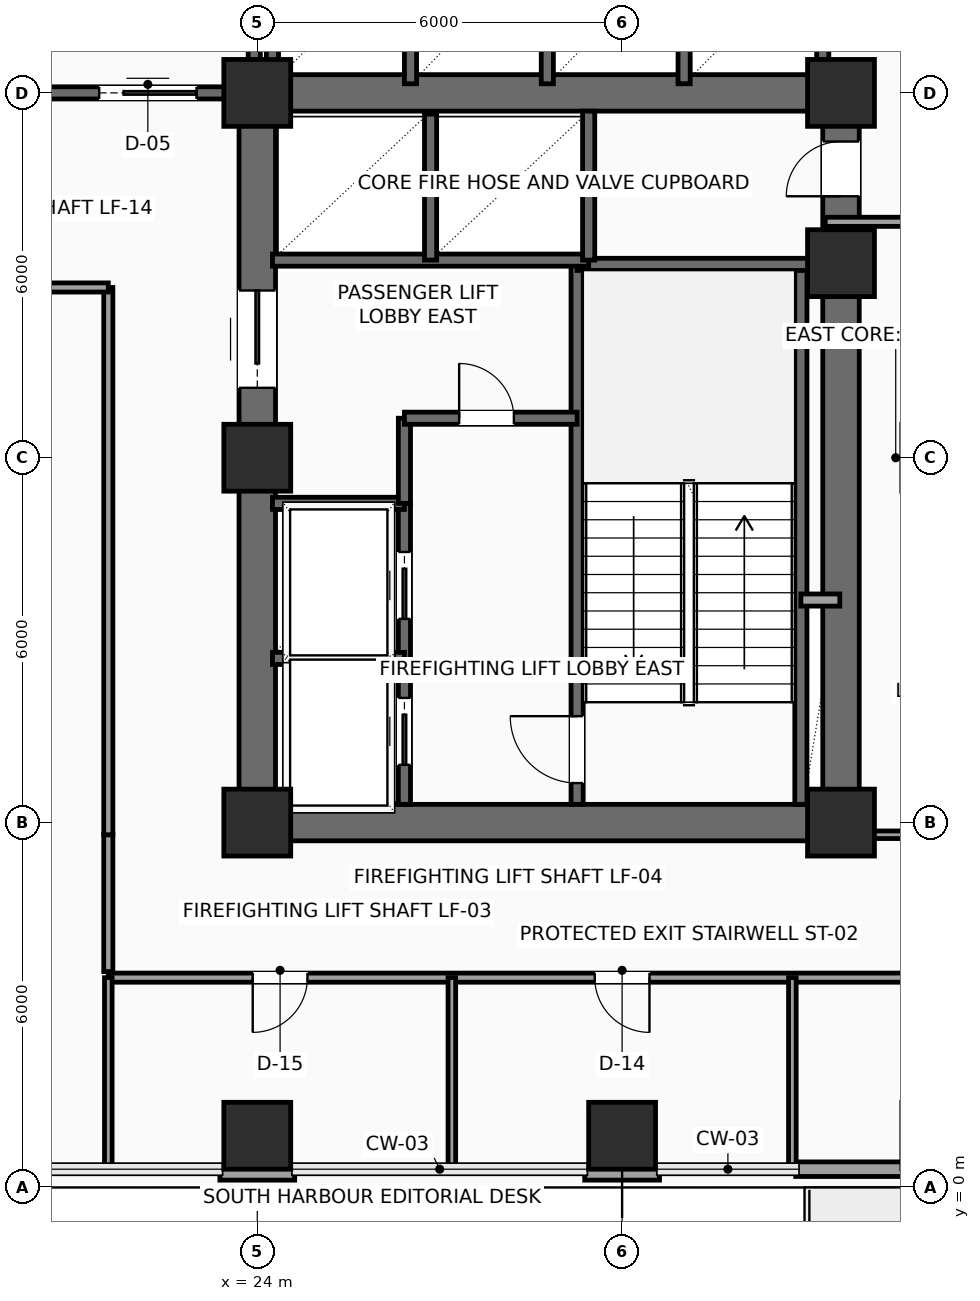
"""IFC4 building model, lengths in metres.
Left out: names, types, materials, properties, quantities, classifications, styles, units other than length and angle.
Written with IfcOpenShell. Run it as: python <this file> out.ifc"""

import sys

from ifc_helpers import new_model, si_unit, direction, frame, frame_2d, origin, origin_2d, place, context, subcontext, project, spatial, rectangle, extrude, element, fill, save


model = new_model("IFC4")
c1 = context("Model", 3, precision=1e-05, world=origin(), true_north=direction((0.0, 1.0)))
c2 = subcontext(c1, "Body", "Model", "MODEL_VIEW")
j1 = project(units=[si_unit("LENGTHUNIT", "METRE"), si_unit("PLANEANGLEUNIT", "RADIAN")], contexts=[c1])
p1 = place(None, origin())
s1 = spatial("IfcSite", under=j1, at=p1, CompositionType="ELEMENT")
p2 = place(p1, origin())
s2 = spatial("IfcBuilding", under=s1, at=p2, CompositionType="ELEMENT")
p3 = place(p2, frame((0.0, 0.0, 103.35)))
s3 = spatial("IfcBuildingStorey", under=s2, at=p3, CompositionType="ELEMENT", Elevation=103.35)
for number, where, z_axis, x_axis in (
    (1, (24.0, 6.0, 0.0), (0.0, 0.0, 1.0), (1.0, 0.0, 0.0)),
    (2, (24.0, 12.0, 0.0), (0.0, 0.0, 1.0), (1.0, 0.0, 0.0)),
    (3, (24.0, 18.0, 0.0), (0.0, 0.0, 1.0), (1.0, 0.0, 0.0)),
    (4, (33.6, 6.0, 0.0), (0.0, 0.0, 1.0), (1.0, 0.0, 0.0)),
    (5, (33.6, 15.2, 0.0), (0.0, 0.0, 1.0), (1.0, 0.0, 0.0)),
    (6, (33.6, 18.0, 0.0), (0.0, 0.0, 1.0), (1.0, 0.0, 0.0)),
    (7, (24.0, 0.85, 0.0), (0.0, 0.0, 1.0), (1.0, 0.0, 0.0)),
    (8, (30.0, 0.85, 0.0), (0.0, 0.0, 1.0), (1.0, 0.0, 0.0)),
):
    element("IfcColumn", number, at=place(p3, frame(where, z_axis=z_axis, x_axis=x_axis)), inside=s3, PredefinedType="COLUMN", context=c2, shape_type="SweptSolid", body=[
        extrude(rectangle(XDim=1.1, YDim=1.1, at=origin_2d()), origin(), (0.0, 0.0, 1.0), 3.75),
    ])
p4 = place(p3, frame((42.145, 0.3, 0.0), z_axis=(0.0, 0.0, 1.0), x_axis=(-1.0, 0.0, 0.0)))
e9 = element("IfcWall", 9, at=p4, inside=s3, PredefinedType="SOLIDWALL", context=c2, shape_type="SweptSolid", body=[
    extrude(rectangle(XDim=9.29, YDim=0.24, at=frame_2d((4.645, 0.0))), origin(), (0.0, 0.0, 1.0), 3.525),
])
p5 = place(p4, frame((4.2, 0.0, 0.0)))
e10 = element("IfcOpeningElement", 10, at=p5, cuts=e9, PredefinedType="OPENING", context=c2, shape_type="SweptSolid", body=[
    extrude(rectangle(XDim=1.05, YDim=2.2, at=frame_2d((0.525, 1.1))), frame((0.0, 0.13, 0.0), z_axis=(0.0, -1.0, 0.0), x_axis=(1.0, 0.0, 0.0)), (0.0, 0.0, 1.0), 0.26),
])
for number, where, z_axis, x_axis in (
    (11, (30.615, 0.24, 0.0), (0.0, 0.0, 1.0), (-1.0, 0.0, 0.0)),
    (12, (24.615, 0.24, 0.0), (0.0, 0.0, 1.0), (-1.0, 0.0, 0.0)),
):
    element("IfcWall", number, at=place(p3, frame(where, z_axis=z_axis, x_axis=x_axis)), inside=s3, PredefinedType="SOLIDWALL", context=c2, shape_type="SweptSolid", body=[
        extrude(rectangle(XDim=1.23, YDim=0.24, at=frame_2d((0.615, 0.0))), origin(), (0.0, 0.0, 1.0), 3.525),
    ])
for number, where, z_axis, x_axis in (
    (13, (24.0, 6.0, 0.0), (0.0, 0.0, 1.0), (1.0, 0.0, 0.0)),
    (14, (24.0, 18.0, 0.0), (0.0, 0.0, 1.0), (1.0, 0.0, 0.0)),
):
    element("IfcWall", number, at=place(p3, frame(where, z_axis=z_axis, x_axis=x_axis)), inside=s3, PredefinedType="SHEAR", context=c2, shape_type="SweptSolid", body=[
        extrude(rectangle(XDim=9.6, YDim=0.6, at=frame_2d((4.8, 0.0))), origin(), (0.0, 0.0, 1.0), 3.525),
    ])
p6 = place(p3, frame((24.0, 6.0, 0.0), z_axis=(0.0, 0.0, 1.0), x_axis=(0.0, 1.0, 0.0)))
e15 = element("IfcWall", 15, at=p6, inside=s3, PredefinedType="SHEAR", context=c2, shape_type="SweptSolid", body=[
    extrude(rectangle(XDim=12.0, YDim=0.6, at=frame_2d((6.0, 0.0))), origin(), (0.0, 0.0, 1.0), 3.525),
])
p7 = place(p6, frame((7.15, 0.0, 0.0)))
e16 = element("IfcOpeningElement", 16, at=p7, cuts=e15, PredefinedType="OPENING", context=c2, shape_type="SweptSolid", body=[
    extrude(rectangle(XDim=1.6, YDim=2.3, at=frame_2d((0.8, 1.15))), frame((0.0, 0.31, 0.0), z_axis=(0.0, -1.0, 0.0), x_axis=(1.0, 0.0, 0.0)), (0.0, 0.0, 1.0), 0.62),
])
p8 = place(p3, frame((33.6, 6.0, 0.0), z_axis=(0.0, 0.0, 1.0), x_axis=(0.0, 1.0, 0.0)))
e17 = element("IfcWall", 17, at=p8, inside=s3, PredefinedType="SHEAR", context=c2, shape_type="SweptSolid", body=[
    extrude(rectangle(XDim=12.0, YDim=0.6, at=frame_2d((6.0, 0.0))), origin(), (0.0, 0.0, 1.0), 3.525),
])
p9 = place(p8, frame((10.3, 0.0, 0.0)))
e18 = element("IfcOpeningElement", 18, at=p9, cuts=e17, PredefinedType="OPENING", context=c2, shape_type="SweptSolid", body=[
    extrude(rectangle(XDim=0.9, YDim=2.15, at=frame_2d((0.45, 1.075))), frame((0.0, 0.31, 0.0), z_axis=(0.0, -1.0, 0.0), x_axis=(1.0, 0.0, 0.0)), (0.0, 0.0, 1.0), 0.62),
])
p10 = place(p3, frame((29.26, 6.3, 0.0), z_axis=(0.0, 0.0, 1.0), x_axis=(0.0, 1.0, 0.0)))
e19 = element("IfcWall", 19, at=p10, inside=s3, PredefinedType="SHEAR", context=c2, shape_type="SweptSolid", body=[
    extrude(rectangle(XDim=8.88, YDim=0.2, at=frame_2d((4.44, 0.0))), origin(), (0.0, 0.0, 1.0), 3.525),
])
p11 = place(p10, frame((0.35, 0.0, 0.0)))
e20 = element("IfcOpeningElement", 20, at=p11, cuts=e19, PredefinedType="OPENING", context=c2, shape_type="SweptSolid", body=[
    extrude(rectangle(XDim=1.1, YDim=2.2, at=frame_2d((0.55, 1.1))), frame((0.0, 0.11, 0.0), z_axis=(0.0, -1.0, 0.0), x_axis=(1.0, 0.0, 0.0)), (0.0, 0.0, 1.0), 0.22),
])
p12 = place(p3, frame((32.94, 6.3, 0.0), z_axis=(0.0, 0.0, 1.0), x_axis=(0.0, 1.0, 0.0)))
e21 = element("IfcWall", 21, at=p12, inside=s3, PredefinedType="SHEAR", context=c2, shape_type="SweptSolid", body=[
    extrude(rectangle(XDim=8.88, YDim=0.2, at=frame_2d((4.44, 0.0))), origin(), (0.0, 0.0, 1.0), 3.525),
])
p13 = place(p3, frame((29.26, 15.18, 0.0), z_axis=(0.0, 0.0, 1.0), x_axis=(1.0, 0.0, 0.0)))
e22 = element("IfcWall", 22, at=p13, inside=s3, PredefinedType="SHEAR", context=c2, shape_type="SweptSolid", body=[
    extrude(rectangle(XDim=4.04, YDim=0.2, at=frame_2d((2.02, 0.0))), origin(), (0.0, 0.0, 1.0), 3.525),
])
p14 = place(p3, frame((26.42, 6.3, 0.0), z_axis=(0.0, 0.0, 1.0), x_axis=(0.0, 1.0, 0.0)))
e23 = element("IfcWall", 23, at=p14, inside=s3, PredefinedType="SHEAR", context=c2, shape_type="SweptSolid", body=[
    extrude(rectangle(XDim=4.95, YDim=0.2, at=frame_2d((2.475, 0.0))), origin(), (0.0, 0.0, 1.0), 3.525),
])
p15 = place(p14, frame((0.65, 0.0, 0.0)))
e24 = element("IfcOpeningElement", 24, at=p15, cuts=e23, PredefinedType="OPENING", context=c2, shape_type="SweptSolid", body=[
    extrude(rectangle(XDim=1.1, YDim=2.2, at=frame_2d((0.55, 1.1))), frame((0.0, 0.11, 0.0), z_axis=(0.0, -1.0, 0.0), x_axis=(1.0, 0.0, 0.0)), (0.0, 0.0, 1.0), 0.22),
])
p16 = place(p14, frame((3.05, 0.0, 0.0)))
e25 = element("IfcOpeningElement", 25, at=p16, cuts=e23, PredefinedType="OPENING", context=c2, shape_type="SweptSolid", body=[
    extrude(rectangle(XDim=1.1, YDim=2.2, at=frame_2d((0.55, 1.1))), frame((0.0, 0.11, 0.0), z_axis=(0.0, -1.0, 0.0), x_axis=(1.0, 0.0, 0.0)), (0.0, 0.0, 1.0), 0.22),
])
for number, where, z_axis, x_axis in (
    (26, (24.25, 8.7, 0.0), (0.0, 0.0, 1.0), (1.0, 0.0, 0.0)),
    (27, (24.25, 11.25, 0.0), (0.0, 0.0, 1.0), (1.0, 0.0, 0.0)),
):
    element("IfcWall", number, at=place(p3, frame(where, z_axis=z_axis, x_axis=x_axis)), inside=s3, PredefinedType="SHEAR", context=c2, shape_type="SweptSolid", body=[
        extrude(rectangle(XDim=2.17, YDim=0.2, at=frame_2d((1.085, 0.0))), origin(), (0.0, 0.0, 1.0), 3.525),
    ])
p17 = place(p3, frame((26.42, 11.25, 0.0), z_axis=(0.0, 0.0, 1.0), x_axis=(0.0, 1.0, 0.0)))
e28 = element("IfcWall", 28, at=p17, inside=s3, PredefinedType="SHEAR", context=c2, shape_type="SweptSolid", body=[
    extrude(rectangle(XDim=1.4, YDim=0.2, at=frame_2d((0.7, 0.0))), origin(), (0.0, 0.0, 1.0), 3.525),
])
p18 = place(p3, frame((26.42, 12.65, 0.0), z_axis=(0.0, 0.0, 1.0), x_axis=(1.0, 0.0, 0.0)))
e29 = element("IfcWall", 29, at=p18, inside=s3, PredefinedType="SHEAR", context=c2, shape_type="SweptSolid", body=[
    extrude(rectangle(XDim=2.84, YDim=0.2, at=frame_2d((1.42, 0.0))), origin(), (0.0, 0.0, 1.0), 3.525),
])
p19 = place(p18, frame((0.9, 0.0, 0.0)))
e30 = element("IfcOpeningElement", 30, at=p19, cuts=e29, PredefinedType="OPENING", context=c2, shape_type="SweptSolid", body=[
    extrude(rectangle(XDim=0.9, YDim=2.15, at=frame_2d((0.45, 1.075))), frame((0.0, 0.11, 0.0), z_axis=(0.0, -1.0, 0.0), x_axis=(1.0, 0.0, 0.0)), (0.0, 0.0, 1.0), 0.22),
])
p20 = place(p3, frame((32.94, 9.66, 0.0), z_axis=(0.0, 0.0, 1.0), x_axis=(1.0, 0.0, 0.0)))
e31 = element("IfcWall", 31, at=p20, inside=s3, PredefinedType="SOLIDWALL", context=c2, shape_type="SweptSolid", body=[
    extrude(rectangle(XDim=0.64, YDim=0.2, at=frame_2d((0.32, 0.0))), origin(), (0.0, 0.0, 1.0), 3.525),
])
p21 = place(p3, frame((24.25, 15.25, 0.0), z_axis=(0.0, 0.0, 1.0), x_axis=(1.0, 0.0, 0.0)))
e32 = element("IfcWall", 32, at=p21, inside=s3, PredefinedType="SHEAR", context=c2, shape_type="SweptSolid", body=[
    extrude(rectangle(XDim=5.2, YDim=0.2, at=frame_2d((2.6, 0.0))), origin(), (0.0, 0.0, 1.0), 3.525),
])
p22 = place(p3, frame((26.85, 15.25, 0.0), z_axis=(0.0, 0.0, 1.0), x_axis=(0.0, 1.0, 0.0)))
e33 = element("IfcWall", 33, at=p22, inside=s3, PredefinedType="SHEAR", context=c2, shape_type="SweptSolid", body=[
    extrude(rectangle(XDim=2.4, YDim=0.2, at=frame_2d((1.2, 0.0))), origin(), (0.0, 0.0, 1.0), 3.525),
])
p23 = place(p3, frame((29.45, 15.25, 0.0), z_axis=(0.0, 0.0, 1.0), x_axis=(0.0, 1.0, 0.0)))
e34 = element("IfcWall", 34, at=p23, inside=s3, PredefinedType="SHEAR", context=c2, shape_type="SweptSolid", body=[
    extrude(rectangle(XDim=2.45, YDim=0.2, at=frame_2d((1.225, 0.0))), origin(), (0.0, 0.0, 1.0), 3.525),
])
p24 = place(p3, frame((20.45, 18.0, 0.0), z_axis=(0.0, 0.0, 1.0), x_axis=(1.0, 0.0, 0.0)))
e35 = element("IfcWall", 35, at=p24, inside=s3, PredefinedType="SHEAR", context=c2, shape_type="SweptSolid", body=[
    extrude(rectangle(XDim=3.5, YDim=0.2, at=frame_2d((1.75, 0.0))), origin(), (0.0, 0.0, 1.0), 3.525),
])
p25 = place(p24, frame((0.95, 0.0, 0.0)))
e36 = element("IfcOpeningElement", 36, at=p25, cuts=e35, PredefinedType="OPENING", context=c2, shape_type="SweptSolid", body=[
    extrude(rectangle(XDim=1.6, YDim=2.3, at=frame_2d((0.8, 1.15))), frame((0.0, 0.11, 0.0), z_axis=(0.0, -1.0, 0.0), x_axis=(1.0, 0.0, 0.0)), (0.0, 0.0, 1.0), 0.22),
])
p26 = place(p3, frame((23.95, 18.0, 0.0), z_axis=(0.0, 0.0, 1.0), x_axis=(0.0, 1.0, 0.0)))
e37 = element("IfcWall", 37, at=p26, inside=s3, PredefinedType="SHEAR", context=c2, shape_type="SweptSolid", body=[
    extrude(rectangle(XDim=9.3, YDim=0.2, at=frame_2d((4.65, 0.0))), origin(), (0.0, 0.0, 1.0), 3.525),
])
for number, where, z_axis, x_axis in (
    (38, (33.3, 18.1, 0.0), (0.0, 0.0, 1.0), (0.0, 1.0, 0.0)),
    (39, (24.25, 18.1, 0.0), (0.0, 0.0, 1.0), (0.0, 1.0, 0.0)),
):
    element("IfcWall", number, at=place(p3, frame(where, z_axis=z_axis, x_axis=x_axis)), inside=s3, PredefinedType="SHEAR", context=c2, shape_type="SweptSolid", body=[
        extrude(rectangle(XDim=2.35, YDim=0.2, at=frame_2d((1.175, 0.0))), origin(), (0.0, 0.0, 1.0), 3.525),
    ])
for number, where, z_axis, x_axis in (
    (40, (26.52, 18.15, 0.0), (0.0, 0.0, 1.0), (0.0, 1.0, 0.0)),
    (41, (28.77, 18.15, 0.0), (0.0, 0.0, 1.0), (0.0, 1.0, 0.0)),
    (42, (31.02, 18.15, 0.0), (0.0, 0.0, 1.0), (0.0, 1.0, 0.0)),
):
    element("IfcWall", number, at=place(p3, frame(where, z_axis=z_axis, x_axis=x_axis)), inside=s3, PredefinedType="SHEAR", context=c2, shape_type="SweptSolid", body=[
        extrude(rectangle(XDim=2.3, YDim=0.2, at=frame_2d((1.15, 0.0))), origin(), (0.0, 0.0, 1.0), 3.525),
    ])
p27 = place(p3, frame((36.15, 15.88, 0.0), z_axis=(0.0, 0.0, 1.0), x_axis=(-1.0, 0.0, 0.0)))
e43 = element("IfcWall", 43, at=p27, inside=s3, PredefinedType="PARTITIONING", context=c2, shape_type="SweptSolid", body=[
    extrude(rectangle(XDim=2.81, YDim=0.15, at=frame_2d((1.405, 0.0))), origin(), (0.0, 0.0, 1.0), 3.525),
])
p28 = place(p3, frame((36.15, 3.45, 0.0), z_axis=(0.0, 0.0, 1.0), x_axis=(-1.0, 0.0, 0.0)))
e44 = element("IfcWall", 44, at=p28, inside=s3, PredefinedType="PARTITIONING", context=c2, shape_type="SweptSolid", body=[
    extrude(rectangle(XDim=14.6, YDim=0.15, at=frame_2d((7.3, 0.0))), origin(), (0.0, 0.0, 1.0), 3.067),
])
p29 = place(p28, frame((11.325, 0.0, 0.0)))
e45 = element("IfcOpeningElement", 45, at=p29, cuts=e44, PredefinedType="OPENING", context=c2, shape_type="SweptSolid", body=[
    extrude(rectangle(XDim=0.9, YDim=2.1, at=frame_2d((0.45, 1.05))), frame((0.0, 0.085, 0.0), z_axis=(0.0, -1.0, 0.0), x_axis=(1.0, 0.0, 0.0)), (0.0, 0.0, 1.0), 0.17),
])
p30 = place(p28, frame((5.7, 0.0, 0.0)))
e46 = element("IfcOpeningElement", 46, at=p30, cuts=e44, PredefinedType="OPENING", context=c2, shape_type="SweptSolid", body=[
    extrude(rectangle(XDim=0.9, YDim=2.1, at=frame_2d((0.45, 1.05))), frame((0.0, 0.085, 0.0), z_axis=(0.0, -1.0, 0.0), x_axis=(1.0, 0.0, 0.0)), (0.0, 0.0, 1.0), 0.17),
])
p31 = place(p3, frame((21.55, 3.55, 0.0), z_axis=(0.0, 0.0, 1.0), x_axis=(0.0, 1.0, 0.0)))
e47 = element("IfcWall", 47, at=p31, inside=s3, PredefinedType="PARTITIONING", context=c2, shape_type="SweptSolid", body=[
    extrude(rectangle(XDim=2.25, YDim=0.15, at=frame_2d((1.125, 0.0))), origin(), (0.0, 0.0, 1.0), 3.525),
])
p32 = place(p3, frame((21.55, 5.8, 0.0), z_axis=(0.0, 0.0, 1.0), x_axis=(0.0, 1.0, 0.0)))
e48 = element("IfcWall", 48, at=p32, inside=s3, PredefinedType="PARTITIONING", context=c2, shape_type="SweptSolid", body=[
    extrude(rectangle(XDim=9.0, YDim=0.15, at=frame_2d((4.5, 0.0))), origin(), (0.0, 0.0, 1.0), 3.525),
])
p33 = place(p3, frame((21.55, 14.8, 0.0), z_axis=(0.0, 0.0, 1.0), x_axis=(-1.0, 0.0, 0.0)))
e49 = element("IfcWall", 49, at=p33, inside=s3, PredefinedType="PARTITIONING", context=c2, shape_type="SweptSolid", body=[
    extrude(rectangle(XDim=8.95, YDim=0.15, at=frame_2d((4.475, 0.0))), origin(), (0.0, 0.0, 1.0), 3.067),
])
p34 = place(p33, frame((6.2, 0.0, 0.0)))
e50 = element("IfcOpeningElement", 50, at=p34, cuts=e49, PredefinedType="OPENING", context=c2, shape_type="SweptSolid", body=[
    extrude(rectangle(XDim=0.9, YDim=2.1, at=frame_2d((0.45, 1.05))), frame((0.0, 0.085, 0.0), z_axis=(0.0, -1.0, 0.0), x_axis=(1.0, 0.0, 0.0)), (0.0, 0.0, 1.0), 0.17),
])
p35 = place(p33, frame((1.725, 0.0, 0.0)))
e51 = element("IfcOpeningElement", 51, at=p35, cuts=e49, PredefinedType="OPENING", context=c2, shape_type="SweptSolid", body=[
    extrude(rectangle(XDim=0.9, YDim=2.1, at=frame_2d((0.45, 1.05))), frame((0.0, 0.085, 0.0), z_axis=(0.0, -1.0, 0.0), x_axis=(1.0, 0.0, 0.0)), (0.0, 0.0, 1.0), 0.17),
])
for number, where, z_axis, x_axis in (
    (52, (21.55, 0.3, 0.0), (0.0, 0.0, 1.0), (0.0, 1.0, 0.0)),
    (53, (27.2, 0.3, 0.0), (0.0, 0.0, 1.0), (0.0, 1.0, 0.0)),
    (54, (32.8, 0.3, 0.0), (0.0, 0.0, 1.0), (0.0, 1.0, 0.0)),
):
    element("IfcWall", number, at=place(p3, frame(where, z_axis=z_axis, x_axis=x_axis)), inside=s3, PredefinedType="PARTITIONING", context=c2, shape_type="SweptSolid", body=[
        extrude(rectangle(XDim=3.15, YDim=0.125, at=frame_2d((1.575, 0.0))), origin(), (0.0, 0.0, 1.0), 3.525),
    ])
p36 = place(p3, frame((33.65, 5.8, 0.0), z_axis=(0.0, 0.0, 1.0), x_axis=(1.0, 0.0, 0.0)))
e55 = element("IfcWall", 55, at=p36, inside=s3, PredefinedType="PARTITIONING", context=c2, shape_type="SweptSolid", body=[
    extrude(rectangle(XDim=2.5, YDim=0.125, at=frame_2d((1.25, 0.0))), origin(), (0.0, 0.0, 1.0), 3.017),
])
p37 = place(p7, origin())
e56 = element("IfcDoor", 56, at=p37, inside=s3, OperationType="DOUBLE_DOOR_SLIDING", PredefinedType="DOOR", context=c2, shape_type="SweptSolid", body=[
    extrude(rectangle(XDim=1.6, YDim=2.3, at=frame_2d((0.8, 1.15))), frame((0.0, 0.025, 0.0), z_axis=(0.0, -1.0, 0.0), x_axis=(1.0, 0.0, 0.0)), (0.0, 0.0, 1.0), 0.05),
])
fill(e16, e56)
p38 = place(p9, origin())
e57 = element("IfcDoor", 57, at=p38, inside=s3, OperationType="SINGLE_SWING_LEFT", PredefinedType="DOOR", context=c2, shape_type="SweptSolid", body=[
    extrude(rectangle(XDim=0.9, YDim=2.15, at=frame_2d((0.45, 1.075))), frame((0.0, 0.025, 0.0), z_axis=(0.0, -1.0, 0.0), x_axis=(1.0, 0.0, 0.0)), (0.0, 0.0, 1.0), 0.05),
])
fill(e18, e57)
p39 = place(p11, origin())
e58 = element("IfcDoor", 58, at=p39, inside=s3, OperationType="SINGLE_SWING_RIGHT", PredefinedType="DOOR", context=c2, shape_type="SweptSolid", body=[
    extrude(rectangle(XDim=1.1, YDim=2.2, at=frame_2d((0.55, 1.1))), frame((0.0, 0.025, 0.0), z_axis=(0.0, -1.0, 0.0), x_axis=(1.0, 0.0, 0.0)), (0.0, 0.0, 1.0), 0.05),
])
fill(e20, e58)
p40 = place(p15, origin())
e59 = element("IfcDoor", 59, at=p40, inside=s3, OperationType="SLIDING_TO_LEFT", PredefinedType="DOOR", context=c2, shape_type="SweptSolid", body=[
    extrude(rectangle(XDim=1.1, YDim=2.2, at=frame_2d((0.55, 1.1))), frame((0.0, 0.025, 0.0), z_axis=(0.0, -1.0, 0.0), x_axis=(1.0, 0.0, 0.0)), (0.0, 0.0, 1.0), 0.05),
])
fill(e24, e59)
p41 = place(p16, origin())
e60 = element("IfcDoor", 60, at=p41, inside=s3, OperationType="SLIDING_TO_LEFT", PredefinedType="DOOR", context=c2, shape_type="SweptSolid", body=[
    extrude(rectangle(XDim=1.1, YDim=2.2, at=frame_2d((0.55, 1.1))), frame((0.0, 0.025, 0.0), z_axis=(0.0, -1.0, 0.0), x_axis=(1.0, 0.0, 0.0)), (0.0, 0.0, 1.0), 0.05),
])
fill(e25, e60)
p42 = place(p19, origin())
e61 = element("IfcDoor", 61, at=p42, inside=s3, OperationType="SINGLE_SWING_LEFT", PredefinedType="DOOR", context=c2, shape_type="SweptSolid", body=[
    extrude(rectangle(XDim=0.9, YDim=2.15, at=frame_2d((0.45, 1.075))), frame((0.0, 0.025, 0.0), z_axis=(0.0, -1.0, 0.0), x_axis=(1.0, 0.0, 0.0)), (0.0, 0.0, 1.0), 0.05),
])
fill(e30, e61)
p43 = place(p25, origin())
e62 = element("IfcDoor", 62, at=p43, inside=s3, OperationType="DOUBLE_DOOR_SLIDING", PredefinedType="DOOR", context=c2, shape_type="SweptSolid", body=[
    extrude(rectangle(XDim=1.6, YDim=2.3, at=frame_2d((0.8, 1.15))), frame((0.0, 0.025, 0.0), z_axis=(0.0, -1.0, 0.0), x_axis=(1.0, 0.0, 0.0)), (0.0, 0.0, 1.0), 0.05),
])
fill(e36, e62)
p44 = place(p29, origin())
e63 = element("IfcDoor", 63, at=p44, inside=s3, OperationType="SINGLE_SWING_RIGHT", PredefinedType="DOOR", context=c2, shape_type="SweptSolid", body=[
    extrude(rectangle(XDim=0.9, YDim=2.1, at=frame_2d((0.45, 1.05))), frame((0.0, 0.025, 0.0), z_axis=(0.0, -1.0, 0.0), x_axis=(1.0, 0.0, 0.0)), (0.0, 0.0, 1.0), 0.05),
])
fill(e45, e63)
p45 = place(p30, origin())
e64 = element("IfcDoor", 64, at=p45, inside=s3, OperationType="SINGLE_SWING_LEFT", PredefinedType="DOOR", context=c2, shape_type="SweptSolid", body=[
    extrude(rectangle(XDim=0.9, YDim=2.1, at=frame_2d((0.45, 1.05))), frame((0.0, 0.025, 0.0), z_axis=(0.0, -1.0, 0.0), x_axis=(1.0, 0.0, 0.0)), (0.0, 0.0, 1.0), 0.05),
])
fill(e46, e64)
save(model, sys.argv[1])
